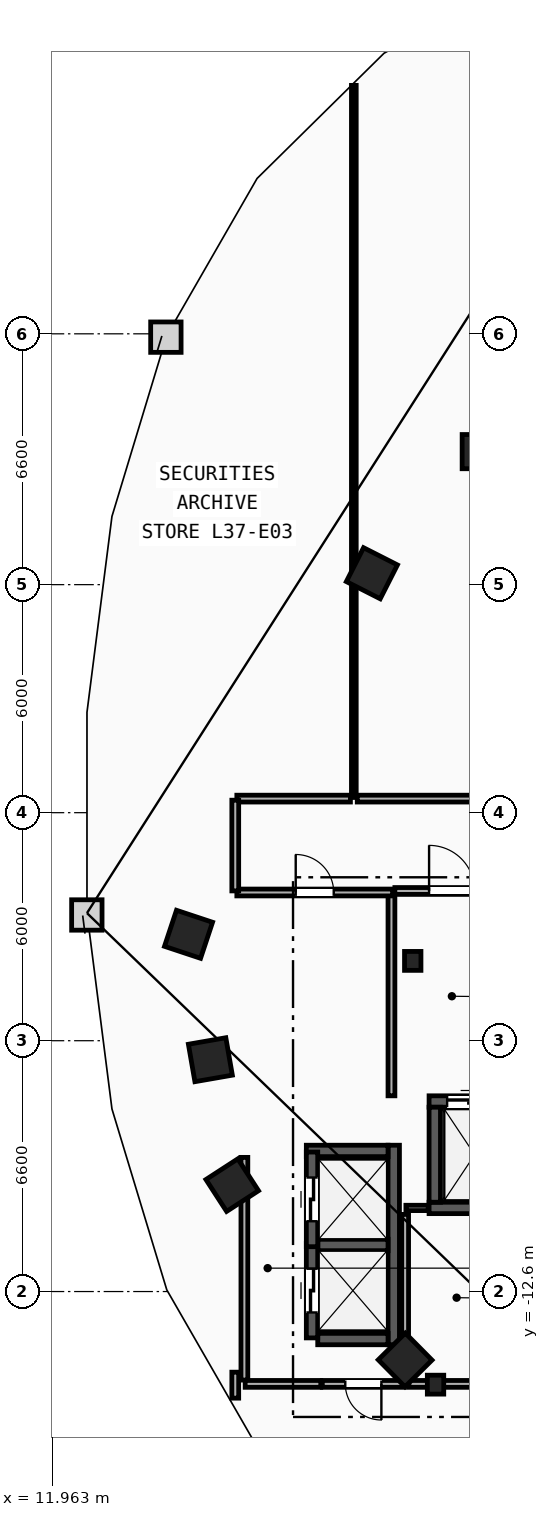
"""IFC4 building model, lengths in metres.
Left out: names, types, materials, properties, quantities, classifications, styles, units other than length and angle.
Written with IfcOpenShell. Run it as: python <this file> out.ifc"""

import sys

from ifc_helpers import new_model, si_unit, direction, frame, frame_2d, origin, origin_2d, place, context, subcontext, project, spatial, rectangle, i_section, extrude, element, fill, save


model = new_model("IFC4")
c1 = context("Model", 3, precision=1e-05, world=origin(), true_north=direction((0.0, 1.0)))
c2 = subcontext(c1, "Body", "Model", "MODEL_VIEW")
j1 = project(units=[si_unit("LENGTHUNIT", "METRE"), si_unit("PLANEANGLEUNIT", "RADIAN")], contexts=[c1])
p1 = place(None, origin())
s1 = spatial("IfcSite", under=j1, at=p1, CompositionType="ELEMENT")
p2 = place(p1, origin())
s2 = spatial("IfcBuilding", under=s1, at=p2, CompositionType="ELEMENT")
p3 = place(p2, frame((0.0, 0.0, 144.0)))
s3 = spatial("IfcBuildingStorey", under=s2, at=p3, CompositionType="ELEMENT", Elevation=144.0)
for number, where, z_axis, x_axis in (
    (1, (21.45, -3.9, 0.0), (0.0, 0.0, 1.0), (1.0, 0.0, 0.0)),
    (2, (22.05, -15.05, 0.0), (0.0, 0.0, 1.0), (1.0, 0.0, 0.0)),
):
    element("IfcColumn", number, at=place(p3, frame(where, z_axis=z_axis, x_axis=x_axis)), inside=s3, PredefinedType="COLUMN", context=c2, shape_type="SweptSolid", body=[
        extrude(i_section(OverallWidth=0.432, OverallDepth=0.498, WebThickness=0.056, FlangeThickness=0.089, FilletRadius=0.018, at=origin_2d()), origin(), (0.0, 0.0, 1.0), 3.6),
    ])
p4 = place(p3, frame((23.2, 9.5, 0.0), z_axis=(0.0, 0.0, 1.0), x_axis=(1.0, 0.0, 0.0)))
e3 = element("IfcColumn", 3, at=p4, inside=s3, PredefinedType="COLUMN", context=c2, shape_type="SweptSolid", body=[
    extrude(rectangle(XDim=0.9, YDim=0.9, at=origin_2d()), origin(), (0.0, 0.0, 1.0), 3.6),
])
for number, where, z_axis, x_axis in (
    (4, (15.55, -3.2, 0.0), (0.0, 0.0, 1.0), (-0.315, -0.949, 0.0)),
    (5, (16.125, -6.5, 0.0), (0.0, 0.0, 1.0), (0.172, -0.985, 0.0)),
    (6, (16.7, -9.8, 0.0), (0.0, 0.0, 1.0), (0.544, -0.839, 0.0)),
    (7, (21.25, -14.4, 0.0), (0.0, 0.0, 1.0), (0.703, -0.711, 0.0)),
    (8, (20.375, 6.3, 0.0), (0.0, 0.0, 1.0), (-0.453, -0.892, 0.0)),
):
    element("IfcColumn", number, at=place(p3, frame(where, z_axis=z_axis, x_axis=x_axis)), inside=s3, PredefinedType="COLUMN", context=c2, shape_type="SweptSolid", body=[
        extrude(rectangle(XDim=1.0, YDim=1.0, at=origin_2d()), origin(), (0.0, 0.0, 1.0), 3.6),
    ])
p5 = place(p3, frame((20.89, -7.45, 0.0), z_axis=(0.0, 0.0, 1.0), x_axis=(0.0, 1.0, 0.0)))
e9 = element("IfcWall", 9, at=p5, inside=s3, PredefinedType="PARTITIONING", context=c2, shape_type="SweptSolid", body=[
    extrude(rectangle(XDim=5.3, YDim=0.18, at=frame_2d((2.65, 0.0))), origin(), (0.0, 0.0, 1.0), 3.36),
])
p6 = place(p3, frame((20.98, -2.06, 0.0), z_axis=(0.0, 0.0, 1.0), x_axis=(1.0, 0.0, 0.0)))
e10 = element("IfcWall", 10, at=p6, inside=s3, PredefinedType="PARTITIONING", context=c2, shape_type="SweptSolid", body=[
    extrude(rectangle(XDim=3.0, YDim=0.18, at=frame_2d((1.5, 0.0))), origin(), (0.0, 0.0, 1.0), 3.36),
])
p7 = place(p6, frame((0.9, 0.0, 0.0)))
e11 = element("IfcOpeningElement", 11, at=p7, cuts=e10, PredefinedType="OPENING", context=c2, shape_type="SweptSolid", body=[
    extrude(rectangle(XDim=1.2, YDim=2.15, at=frame_2d((0.6, 1.075))), frame((0.0, 0.1, 0.0), z_axis=(0.0, -1.0, 0.0), x_axis=(1.0, 0.0, 0.0)), (0.0, 0.0, 1.0), 0.2),
])
p8 = place(p3, frame((21.88, -7.6, 0.0), z_axis=(0.0, 0.0, 1.0), x_axis=(1.0, 0.0, 0.0)))
e12 = element("IfcWall", 12, at=p8, inside=s3, PredefinedType="SHEAR", context=c2, shape_type="SweptSolid", body=[
    extrude(rectangle(XDim=2.1, YDim=0.3, at=frame_2d((1.05, 0.0))), origin(), (0.0, 0.0, 1.0), 3.36),
])
p9 = place(p8, frame((0.475, 0.0, 0.0)))
e13 = element("IfcOpeningElement", 13, at=p9, cuts=e12, PredefinedType="OPENING", context=c2, shape_type="SweptSolid", body=[
    extrude(rectangle(XDim=1.15, YDim=2.2, at=frame_2d((0.575, 1.1))), frame((0.0, 0.16, 0.0), z_axis=(0.0, -1.0, 0.0), x_axis=(1.0, 0.0, 0.0)), (0.0, 0.0, 1.0), 0.32),
])
p10 = place(p3, frame((21.88, -10.4, 0.0), z_axis=(0.0, 0.0, 1.0), x_axis=(1.0, 0.0, 0.0)))
e14 = element("IfcWall", 14, at=p10, inside=s3, PredefinedType="SHEAR", context=c2, shape_type="SweptSolid", body=[
    extrude(rectangle(XDim=2.1, YDim=0.3, at=frame_2d((1.05, 0.0))), origin(), (0.0, 0.0, 1.0), 3.36),
])
p11 = place(p3, frame((22.03, -10.25, 0.0), z_axis=(0.0, 0.0, 1.0), x_axis=(0.0, 1.0, 0.0)))
e15 = element("IfcWall", 15, at=p11, inside=s3, PredefinedType="SHEAR", context=c2, shape_type="SweptSolid", body=[
    extrude(rectangle(XDim=2.5, YDim=0.3, at=frame_2d((1.25, 0.0))), origin(), (0.0, 0.0, 1.0), 3.36),
])
p12 = place(p3, frame((20.95, -14.0, 0.0), z_axis=(0.0, 0.0, 1.0), x_axis=(0.0, 1.0, 0.0)))
e16 = element("IfcWall", 16, at=p12, inside=s3, PredefinedType="SHEAR", context=c2, shape_type="SweptSolid", body=[
    extrude(rectangle(XDim=5.25, YDim=0.3, at=frame_2d((2.625, 0.0))), origin(), (0.0, 0.0, 1.0), 3.36),
])
p13 = place(p3, frame((18.95, -13.85, 0.0), z_axis=(0.0, 0.0, 1.0), x_axis=(1.0, 0.0, 0.0)))
e17 = element("IfcWall", 17, at=p13, inside=s3, PredefinedType="SHEAR", context=c2, shape_type="SweptSolid", body=[
    extrude(rectangle(XDim=1.85, YDim=0.3, at=frame_2d((0.925, 0.0))), origin(), (0.0, 0.0, 1.0), 3.36),
])
p14 = place(p3, frame((18.65, -8.9, 0.0), z_axis=(0.0, 0.0, 1.0), x_axis=(1.0, 0.0, 0.0)))
e18 = element("IfcWall", 18, at=p14, inside=s3, PredefinedType="SHEAR", context=c2, shape_type="SweptSolid", body=[
    extrude(rectangle(XDim=2.15, YDim=0.3, at=frame_2d((1.075, 0.0))), origin(), (0.0, 0.0, 1.0), 3.36),
])
p15 = place(p3, frame((18.95, -11.375, 0.0), z_axis=(0.0, 0.0, 1.0), x_axis=(1.0, 0.0, 0.0)))
e19 = element("IfcWall", 19, at=p15, inside=s3, PredefinedType="SHEAR", context=c2, shape_type="SweptSolid", body=[
    extrude(rectangle(XDim=1.85, YDim=0.3, at=frame_2d((0.925, 0.0))), origin(), (0.0, 0.0, 1.0), 3.36),
])
p16 = place(p3, frame((18.8, -13.82, 0.0), z_axis=(0.0, 0.0, 1.0), x_axis=(0.0, 1.0, 0.0)))
e20 = element("IfcWall", 20, at=p16, inside=s3, PredefinedType="SHEAR", context=c2, shape_type="SweptSolid", body=[
    extrude(rectangle(XDim=2.49, YDim=0.3, at=frame_2d((1.245, 0.0))), origin(), (0.0, 0.0, 1.0), 3.36),
])
p17 = place(p16, frame((0.67, 0.0, 0.0)))
e21 = element("IfcOpeningElement", 21, at=p17, cuts=e20, PredefinedType="OPENING", context=c2, shape_type="SweptSolid", body=[
    extrude(rectangle(XDim=1.15, YDim=2.2, at=frame_2d((0.575, 1.1))), frame((0.0, 0.16, 0.0), z_axis=(0.0, -1.0, 0.0), x_axis=(1.0, 0.0, 0.0)), (0.0, 0.0, 1.0), 0.32),
])
p18 = place(p3, frame((18.8, -11.42, 0.0), z_axis=(0.0, 0.0, 1.0), x_axis=(0.0, 1.0, 0.0)))
e22 = element("IfcWall", 22, at=p18, inside=s3, PredefinedType="SHEAR", context=c2, shape_type="SweptSolid", body=[
    extrude(rectangle(XDim=2.49, YDim=0.3, at=frame_2d((1.245, 0.0))), origin(), (0.0, 0.0, 1.0), 3.36),
])
p19 = place(p18, frame((0.67, 0.0, 0.0)))
e23 = element("IfcOpeningElement", 23, at=p19, cuts=e22, PredefinedType="OPENING", context=c2, shape_type="SweptSolid", body=[
    extrude(rectangle(XDim=1.15, YDim=2.2, at=frame_2d((0.575, 1.1))), frame((0.0, 0.16, 0.0), z_axis=(0.0, -1.0, 0.0), x_axis=(1.0, 0.0, 0.0)), (0.0, 0.0, 1.0), 0.32),
])
p20 = place(p3, frame((17.02, -14.93, 0.0), z_axis=(0.0, 0.0, 1.0), x_axis=(0.0, 1.0, 0.0)))
e24 = element("IfcWall", 24, at=p20, inside=s3, PredefinedType="PARTITIONING", context=c2, shape_type="SweptSolid", body=[
    extrude(rectangle(XDim=5.86, YDim=0.18, at=frame_2d((2.93, 0.0))), origin(), (0.0, 0.0, 1.0), 3.36),
])
p21 = place(p3, frame((17.04, -15.03, 0.0), z_axis=(0.0, 0.0, 1.0), x_axis=(1.0, 0.0, 0.0)))
e25 = element("IfcWall", 25, at=p21, inside=s3, PredefinedType="PARTITIONING", context=c2, shape_type="SweptSolid", body=[
    extrude(rectangle(XDim=1.99, YDim=0.18, at=frame_2d((0.995, 0.0))), origin(), (0.0, 0.0, 1.0), 3.36),
])
p22 = place(p3, frame((21.23, -15.03, 0.0), z_axis=(0.0, 0.0, 1.0), x_axis=(-1.0, 0.0, 0.0)))
e26 = element("IfcWall", 26, at=p22, inside=s3, PredefinedType="PARTITIONING", context=c2, shape_type="SweptSolid", body=[
    extrude(rectangle(XDim=2.16, YDim=0.18, at=frame_2d((1.08, 0.0))), origin(), (0.0, 0.0, 1.0), 3.36),
])
p23 = place(p22, frame((0.605, 0.0, 0.0)))
e27 = element("IfcOpeningElement", 27, at=p23, cuts=e26, PredefinedType="OPENING", context=c2, shape_type="SweptSolid", body=[
    extrude(rectangle(XDim=0.95, YDim=2.1, at=frame_2d((0.475, 1.05))), frame((0.0, 0.1, 0.0), z_axis=(0.0, -1.0, 0.0), x_axis=(1.0, 0.0, 0.0)), (0.0, 0.0, 1.0), 0.2),
])
p24 = place(p3, frame((21.27, -10.4, 0.0), z_axis=(0.0, 0.0, 1.0), x_axis=(1.0, 0.0, 0.0)))
e28 = element("IfcWall", 28, at=p24, inside=s3, PredefinedType="PARTITIONING", context=c2, shape_type="SweptSolid", body=[
    extrude(rectangle(XDim=0.59, YDim=0.14, at=frame_2d((0.295, 0.0))), origin(), (0.0, 0.0, 1.0), 3.36),
])
p25 = place(p3, frame((21.25, -14.93, 0.0), z_axis=(0.0, 0.0, 1.0), x_axis=(0.0, 1.0, 0.0)))
e29 = element("IfcWall", 29, at=p25, inside=s3, PredefinedType="PARTITIONING", context=c2, shape_type="SweptSolid", body=[
    extrude(rectangle(XDim=4.36, YDim=0.18, at=frame_2d((2.18, 0.0))), origin(), (0.0, 0.0, 1.0), 3.36),
])
p26 = place(p3, frame((21.35, -15.03, 0.0), z_axis=(0.0, 0.0, 1.0), x_axis=(1.0, 0.0, 0.0)))
e30 = element("IfcWall", 30, at=p26, inside=s3, PredefinedType="PARTITIONING", context=c2, shape_type="SweptSolid", body=[
    extrude(rectangle(XDim=2.61, YDim=0.18, at=frame_2d((1.305, 0.0))), origin(), (0.0, 0.0, 1.0), 2.433),
])
p27 = place(p3, frame((19.9, 0.4, 0.0), z_axis=(0.0, 0.0, 1.0), x_axis=(0.0, 1.0, 0.0)))
e31 = element("IfcWall", 31, at=p27, inside=s3, PredefinedType="PARTITIONING", context=c2, shape_type="SweptSolid", body=[
    extrude(rectangle(XDim=18.737, YDim=0.125, at=frame_2d((9.368, 0.0))), origin(), (0.0, 0.0, 1.0), 3.36),
])
p28 = place(p3, frame((16.822, -2.1, 0.0), z_axis=(0.0, 0.0, 1.0), x_axis=(1.0, 0.0, 0.0)))
e32 = element("IfcWall", 32, at=p28, inside=s3, PredefinedType="PARTITIONING", context=c2, shape_type="SweptSolid", body=[
    extrude(rectangle(XDim=4.098, YDim=0.18, at=frame_2d((2.049, 0.0))), origin(), (0.0, 0.0, 1.0), 3.36),
])
p29 = place(p28, frame((1.549, 0.0, 0.0)))
e33 = element("IfcOpeningElement", 33, at=p29, cuts=e32, PredefinedType="OPENING", context=c2, shape_type="SweptSolid", body=[
    extrude(rectangle(XDim=1.0, YDim=2.15, at=frame_2d((0.5, 1.075))), frame((0.0, 0.1, 0.0), z_axis=(0.0, -1.0, 0.0), x_axis=(1.0, 0.0, 0.0)), (0.0, 0.0, 1.0), 0.2),
])
p30 = place(p3, frame((19.81, 0.37, 0.0), z_axis=(0.0, 0.0, 1.0), x_axis=(-1.0, 0.0, 0.0)))
e34 = element("IfcWall", 34, at=p30, inside=s3, PredefinedType="PARTITIONING", context=c2, shape_type="SweptSolid", body=[
    extrude(rectangle(XDim=2.989, YDim=0.18, at=frame_2d((1.494, 0.0))), origin(), (0.0, 0.0, 1.0), 3.36),
])
p31 = place(p3, frame((16.78, 0.329, 0.0), z_axis=(0.0, 0.0, 1.0), x_axis=(0.0, -1.0, 0.0)))
e35 = element("IfcWall", 35, at=p31, inside=s3, PredefinedType="PARTITIONING", context=c2, shape_type="SweptSolid", body=[
    extrude(rectangle(XDim=2.387, YDim=0.18, at=frame_2d((1.194, 0.0))), origin(), (0.0, 0.0, 1.0), 3.36),
])
p32 = place(p3, frame((16.78, -14.721, 0.0), z_axis=(0.0, 0.0, 1.0), x_axis=(0.0, -1.0, 0.0)))
e36 = element("IfcWall", 36, at=p32, inside=s3, PredefinedType="PARTITIONING", context=c2, shape_type="SweptSolid", body=[
    extrude(rectangle(XDim=0.684, YDim=0.18, at=frame_2d((0.342, 0.0))), origin(), (0.0, 0.0, 1.0), 3.36),
])
p33 = place(p3, frame((25.4, 0.37, 0.0), z_axis=(0.0, 0.0, 1.0), x_axis=(-1.0, 0.0, 0.0)))
e37 = element("IfcWall", 37, at=p33, inside=s3, PredefinedType="PARTITIONING", context=c2, shape_type="SweptSolid", body=[
    extrude(rectangle(XDim=5.41, YDim=0.18, at=frame_2d((2.705, 0.0))), origin(), (0.0, 0.0, 1.0), 3.36),
])
p34 = place(p7, origin())
e38 = element("IfcDoor", 38, at=p34, inside=s3, OperationType="SINGLE_SWING_LEFT", PredefinedType="DOOR", context=c2, shape_type="SweptSolid", body=[
    extrude(rectangle(XDim=1.2, YDim=2.15, at=frame_2d((0.6, 1.075))), frame((0.0, 0.025, 0.0), z_axis=(0.0, -1.0, 0.0), x_axis=(1.0, 0.0, 0.0)), (0.0, 0.0, 1.0), 0.05),
])
fill(e11, e38)
p35 = place(p9, origin())
e39 = element("IfcDoor", 39, at=p35, inside=s3, OperationType="SLIDING_TO_LEFT", PredefinedType="TRAPDOOR", context=c2, shape_type="SweptSolid", body=[
    extrude(rectangle(XDim=1.15, YDim=2.2, at=frame_2d((0.575, 1.1))), frame((0.0, 0.025, 0.0), z_axis=(0.0, -1.0, 0.0), x_axis=(1.0, 0.0, 0.0)), (0.0, 0.0, 1.0), 0.05),
])
fill(e13, e39)
p36 = place(p17, origin())
e40 = element("IfcDoor", 40, at=p36, inside=s3, OperationType="SLIDING_TO_LEFT", PredefinedType="TRAPDOOR", context=c2, shape_type="SweptSolid", body=[
    extrude(rectangle(XDim=1.15, YDim=2.2, at=frame_2d((0.575, 1.1))), frame((0.0, 0.025, 0.0), z_axis=(0.0, -1.0, 0.0), x_axis=(1.0, 0.0, 0.0)), (0.0, 0.0, 1.0), 0.05),
])
fill(e21, e40)
p37 = place(p19, origin())
e41 = element("IfcDoor", 41, at=p37, inside=s3, OperationType="SLIDING_TO_LEFT", PredefinedType="TRAPDOOR", context=c2, shape_type="SweptSolid", body=[
    extrude(rectangle(XDim=1.15, YDim=2.2, at=frame_2d((0.575, 1.1))), frame((0.0, 0.025, 0.0), z_axis=(0.0, -1.0, 0.0), x_axis=(1.0, 0.0, 0.0)), (0.0, 0.0, 1.0), 0.05),
])
fill(e23, e41)
p38 = place(p29, origin())
e42 = element("IfcDoor", 42, at=p38, inside=s3, OperationType="SINGLE_SWING_LEFT", PredefinedType="DOOR", context=c2, shape_type="SweptSolid", body=[
    extrude(rectangle(XDim=1.0, YDim=2.15, at=frame_2d((0.5, 1.075))), frame((0.0, 0.025, 0.0), z_axis=(0.0, -1.0, 0.0), x_axis=(1.0, 0.0, 0.0)), (0.0, 0.0, 1.0), 0.05),
])
fill(e33, e42)
p39 = place(p23, origin())
e43 = element("IfcDoor", 43, at=p39, inside=s3, OperationType="SINGLE_SWING_LEFT", PredefinedType="DOOR", context=c2, shape_type="SweptSolid", body=[
    extrude(rectangle(XDim=0.95, YDim=2.1, at=frame_2d((0.475, 1.05))), frame((0.0, 0.025, 0.0), z_axis=(0.0, -1.0, 0.0), x_axis=(1.0, 0.0, 0.0)), (0.0, 0.0, 1.0), 0.05),
])
fill(e27, e43)
save(model, sys.argv[1])
